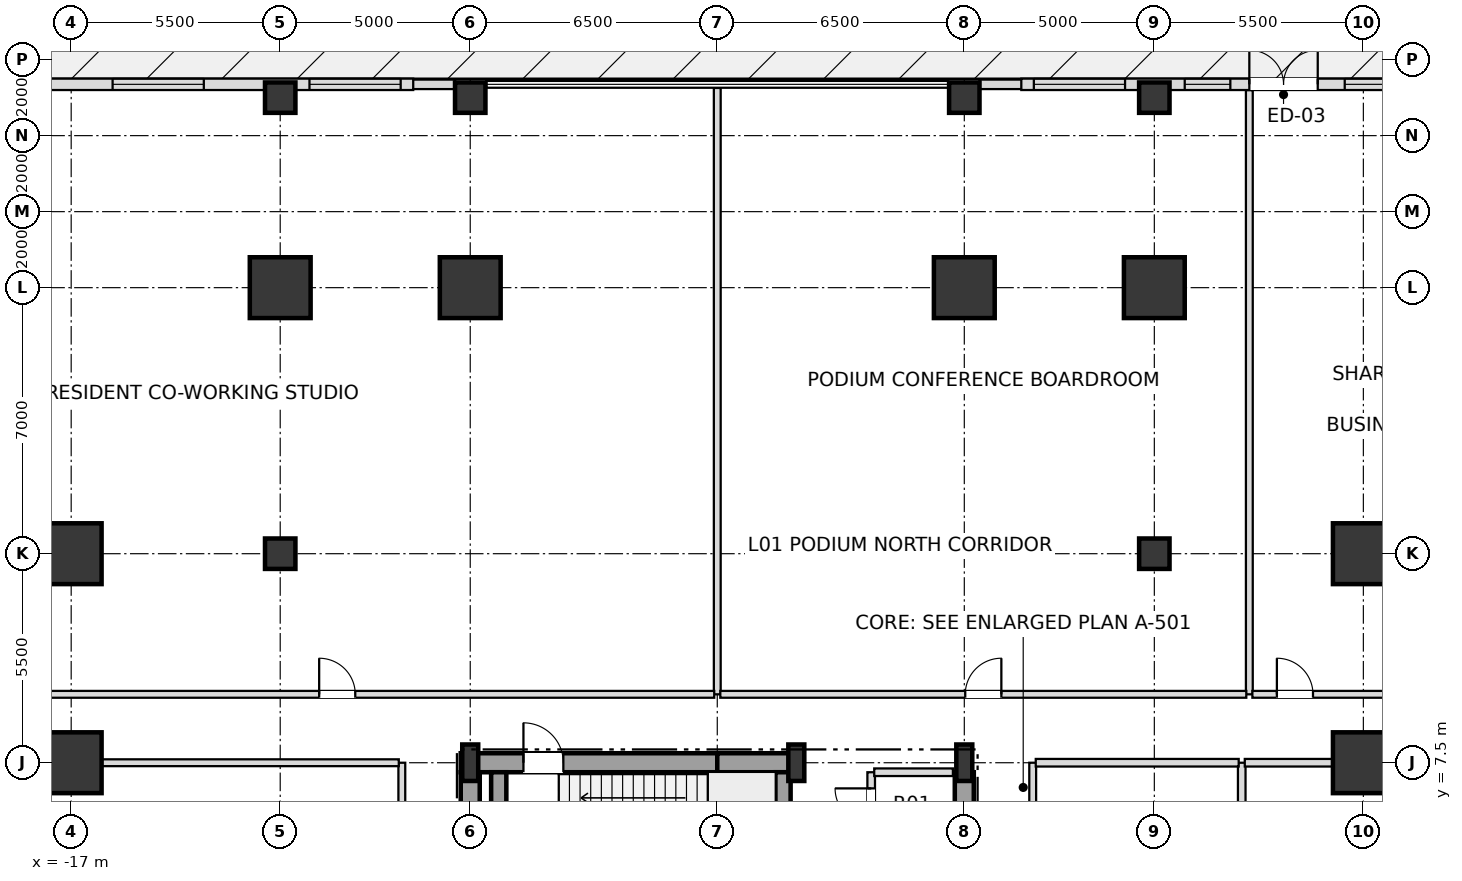
"""IFC4 building model, lengths in metres.
Left out: names, types, materials, properties, quantities, classifications, styles, units other than length and angle.
Written with IfcOpenShell. Run it as: python <this file> out.ifc"""

import sys

from ifc_helpers import new_model, si_unit, direction, frame, frame_2d, origin, origin_2d, place, context, subcontext, project, spatial, rectangle, i_section, extrude, element, fill, save


model = new_model("IFC4")
c1 = context("Model", 3, precision=1e-05, world=origin(), true_north=direction((0.0, 1.0)))
c2 = subcontext(c1, "Body", "Model", "MODEL_VIEW")
j1 = project(units=[si_unit("LENGTHUNIT", "METRE"), si_unit("PLANEANGLEUNIT", "RADIAN")], contexts=[c1])
p1 = place(None, origin())
s1 = spatial("IfcSite", under=j1, at=p1, CompositionType="ELEMENT")
p2 = place(p1, origin())
s2 = spatial("IfcBuilding", under=s1, at=p2, CompositionType="ELEMENT")
p3 = place(p2, frame((0.0, 0.0, 6.0)))
s3 = spatial("IfcBuildingStorey", under=s2, at=p3, CompositionType="ELEMENT", Elevation=6.0)
for number, where, z_axis, x_axis in (
    (1, (-6.5, 7.5, 0.0), (0.0, 0.0, 1.0), (1.0, 0.0, 0.0)),
    (2, (2.08, 7.5, 0.0), (0.0, 0.0, 1.0), (1.0, 0.0, 0.0)),
    (3, (6.5, 7.5, 0.0), (0.0, 0.0, 1.0), (1.0, 0.0, 0.0)),
):
    element("IfcColumn", number, at=place(p3, frame(where, z_axis=z_axis, x_axis=x_axis)), inside=s3, PredefinedType="COLUMN", context=c2, shape_type="SweptSolid", body=[
        extrude(i_section(OverallWidth=0.42, OverallDepth=0.96, WebThickness=0.022, FlangeThickness=0.034, at=origin_2d()), origin(), (0.0, 0.0, 1.0), 5.4),
    ])
for number, where, z_axis, x_axis in (
    (4, (17.0, 7.5, 0.0), (0.0, 0.0, 1.0), (1.0, 0.0, 0.0)),
    (5, (17.0, 13.0, 0.0), (0.0, 0.0, 1.0), (1.0, 0.0, 0.0)),
    (6, (11.5, 20.0, 0.0), (0.0, 0.0, 1.0), (1.0, 0.0, 0.0)),
    (7, (6.5, 20.0, 0.0), (0.0, 0.0, 1.0), (1.0, 0.0, 0.0)),
    (8, (-6.5, 20.0, 0.0), (0.0, 0.0, 1.0), (1.0, 0.0, 0.0)),
    (9, (-11.5, 20.0, 0.0), (0.0, 0.0, 1.0), (1.0, 0.0, 0.0)),
    (10, (-17.0, 13.0, 0.0), (0.0, 0.0, 1.0), (1.0, 0.0, 0.0)),
    (11, (-17.0, 7.5, 0.0), (0.0, 0.0, 1.0), (1.0, 0.0, 0.0)),
):
    element("IfcColumn", number, at=place(p3, frame(where, z_axis=z_axis, x_axis=x_axis)), inside=s3, PredefinedType="USERDEFINED", context=c2, shape_type="SweptSolid", body=[
        extrude(rectangle(XDim=1.6, YDim=1.6, at=origin_2d()), origin(), (0.0, 0.0, 1.0), 5.4),
    ])
for number, where, z_axis, x_axis in (
    (12, (-11.5, 13.0, 0.0), (0.0, 0.0, 1.0), (1.0, 0.0, 0.0)),
    (13, (11.5, 13.0, 0.0), (0.0, 0.0, 1.0), (1.0, 0.0, 0.0)),
    (14, (-11.5, 25.0, 0.0), (0.0, 0.0, 1.0), (1.0, 0.0, 0.0)),
    (15, (-6.5, 25.0, 0.0), (0.0, 0.0, 1.0), (1.0, 0.0, 0.0)),
    (16, (6.5, 25.0, 0.0), (0.0, 0.0, 1.0), (1.0, 0.0, 0.0)),
    (17, (11.5, 25.0, 0.0), (0.0, 0.0, 1.0), (1.0, 0.0, 0.0)),
):
    element("IfcColumn", number, at=place(p3, frame(where, z_axis=z_axis, x_axis=x_axis)), inside=s3, PredefinedType="COLUMN", context=c2, shape_type="SweptSolid", body=[
        extrude(rectangle(XDim=0.8, YDim=0.8, at=origin_2d()), origin(), (0.0, 0.0, 1.0), 5.4),
    ])
for number, where, z_axis, x_axis in (
    (18, (8.025, 25.35, 0.0), (0.0, 0.0, 1.0), (-1.0, 0.0, 0.0)),
    (19, (-6.895, 25.35, 0.0), (0.0, 0.0, 1.0), (-1.0, 0.0, 0.0)),
):
    element("IfcWall", number, at=place(p3, frame(where, z_axis=z_axis, x_axis=x_axis)), inside=s3, PredefinedType="SOLIDWALL", context=c2, shape_type="SweptSolid", body=[
        extrude(rectangle(XDim=1.13, YDim=0.25, at=frame_2d((0.565, 0.0))), origin(), (0.0, 0.0, 1.0), 4.476),
    ])
p4 = place(p3, frame((-22.85, 25.35, 0.0), z_axis=(0.0, 0.0, 1.0), x_axis=(1.0, 0.0, 0.0)))
e20 = element("IfcWall", 20, at=p4, inside=s3, PredefinedType="SOLIDWALL", context=c2, shape_type="SweptSolid", body=[
    extrude(rectangle(XDim=14.85, YDim=0.3, at=frame_2d((7.425, 0.0))), origin(), (0.0, 0.0, 1.0), 4.476),
])
p5 = place(p4, frame((1.72, 0.0, 0.8)))
e21 = element("IfcOpeningElement", 21, at=p5, cuts=e20, PredefinedType="OPENING", context=c2, shape_type="SweptSolid", body=[
    extrude(rectangle(XDim=2.4, YDim=2.2, at=frame_2d((1.2, 1.1))), frame((0.0, 0.16, 0.0), z_axis=(0.0, -1.0, 0.0), x_axis=(1.0, 0.0, 0.0)), (0.0, 0.0, 1.0), 0.32),
])
p6 = place(p4, frame((6.94, 0.0, 0.8)))
e22 = element("IfcOpeningElement", 22, at=p6, cuts=e20, PredefinedType="OPENING", context=c2, shape_type="SweptSolid", body=[
    extrude(rectangle(XDim=2.4, YDim=2.2, at=frame_2d((1.2, 1.1))), frame((0.0, 0.16, 0.0), z_axis=(0.0, -1.0, 0.0), x_axis=(1.0, 0.0, 0.0)), (0.0, 0.0, 1.0), 0.32),
])
p7 = place(p4, frame((12.12, 0.0, 0.8)))
e23 = element("IfcOpeningElement", 23, at=p7, cuts=e20, PredefinedType="OPENING", context=c2, shape_type="SweptSolid", body=[
    extrude(rectangle(XDim=2.4, YDim=2.2, at=frame_2d((1.2, 1.1))), frame((0.0, 0.16, 0.0), z_axis=(0.0, -1.0, 0.0), x_axis=(1.0, 0.0, 0.0)), (0.0, 0.0, 1.0), 0.32),
])
p8 = place(p3, frame((8.0, 25.35, 0.0), z_axis=(0.0, 0.0, 1.0), x_axis=(1.0, 0.0, 0.0)))
e24 = element("IfcWall", 24, at=p8, inside=s3, PredefinedType="SOLIDWALL", context=c2, shape_type="SweptSolid", body=[
    extrude(rectangle(XDim=14.85, YDim=0.3, at=frame_2d((7.425, 0.0))), origin(), (0.0, 0.0, 1.0), 4.476),
])
p9 = place(p8, frame((6.0, 0.0, 0.0)))
e25 = element("IfcOpeningElement", 25, at=p9, cuts=e24, PredefinedType="OPENING", context=c2, shape_type="SweptSolid", body=[
    extrude(rectangle(XDim=1.8, YDim=2.3, at=frame_2d((0.9, 1.15))), frame((0.0, 0.16, 0.0), z_axis=(0.0, -1.0, 0.0), x_axis=(1.0, 0.0, 0.0)), (0.0, 0.0, 1.0), 0.32),
])
p10 = place(p8, frame((0.33, 0.0, 0.8)))
e26 = element("IfcOpeningElement", 26, at=p10, cuts=e24, PredefinedType="OPENING", context=c2, shape_type="SweptSolid", body=[
    extrude(rectangle(XDim=2.4, YDim=2.2, at=frame_2d((1.2, 1.1))), frame((0.0, 0.16, 0.0), z_axis=(0.0, -1.0, 0.0), x_axis=(1.0, 0.0, 0.0)), (0.0, 0.0, 1.0), 0.32),
])
p11 = place(p8, frame((4.3, 0.0, 0.72)))
e27 = element("IfcOpeningElement", 27, at=p11, cuts=e24, PredefinedType="OPENING", context=c2, shape_type="SweptSolid", body=[
    extrude(rectangle(XDim=1.2, YDim=1.68, at=frame_2d((0.6, 0.84))), frame((0.0, 0.16, 0.0), z_axis=(0.0, -1.0, 0.0), x_axis=(1.0, 0.0, 0.0)), (0.0, 0.0, 1.0), 0.32),
])
p12 = place(p8, frame((8.51, 0.0, 0.8)))
e28 = element("IfcOpeningElement", 28, at=p12, cuts=e24, PredefinedType="OPENING", context=c2, shape_type="SweptSolid", body=[
    extrude(rectangle(XDim=2.4, YDim=2.2, at=frame_2d((1.2, 1.1))), frame((0.0, 0.16, 0.0), z_axis=(0.0, -1.0, 0.0), x_axis=(1.0, 0.0, 0.0)), (0.0, 0.0, 1.0), 0.32),
])
p13 = place(p8, frame((11.73, 0.0, 0.8)))
e29 = element("IfcOpeningElement", 29, at=p13, cuts=e24, PredefinedType="OPENING", context=c2, shape_type="SweptSolid", body=[
    extrude(rectangle(XDim=2.4, YDim=2.2, at=frame_2d((1.2, 1.1))), frame((0.0, 0.16, 0.0), z_axis=(0.0, -1.0, 0.0), x_axis=(1.0, 0.0, 0.0)), (0.0, 0.0, 1.0), 0.32),
])
p14 = place(p3, frame((-6.75, 7.5, 0.0), z_axis=(0.0, 0.0, 1.0), x_axis=(1.0, 0.0, 0.0)))
e30 = element("IfcWall", 30, at=p14, inside=s3, PredefinedType="SHEAR", context=c2, shape_type="SweptSolid", body=[
    extrude(rectangle(XDim=6.75, YDim=0.5, at=frame_2d((3.375, 0.0))), origin(), (0.0, 0.0, 1.0), 5.12),
])
p15 = place(p14, frame((1.65, 0.0, 0.0)))
e31 = element("IfcOpeningElement", 31, at=p15, cuts=e30, PredefinedType="OPENING", context=c2, shape_type="SweptSolid", body=[
    extrude(rectangle(XDim=1.05, YDim=2.15, at=frame_2d((0.525, 1.075))), frame((0.0, 0.26, 0.0), z_axis=(0.0, -1.0, 0.0), x_axis=(1.0, 0.0, 0.0)), (0.0, 0.0, 1.0), 0.52),
])
p16 = place(p3, frame((0.0, 7.5, 0.0), z_axis=(0.0, 0.0, 1.0), x_axis=(1.0, 0.0, 0.0)))
e32 = element("IfcWall", 32, at=p16, inside=s3, PredefinedType="SHEAR", context=c2, shape_type="SweptSolid", body=[
    extrude(rectangle(XDim=2.08, YDim=0.5, at=frame_2d((1.04, 0.0))), origin(), (0.0, 0.0, 1.0), 5.12),
])
for number, where, z_axis, x_axis in (
    (33, (-6.5, 3.95, 0.0), (0.0, 0.0, 1.0), (0.0, 1.0, 0.0)),
    (34, (6.5, 3.95, 0.0), (0.0, 0.0, 1.0), (0.0, 1.0, 0.0)),
):
    element("IfcWall", number, at=place(p3, frame(where, z_axis=z_axis, x_axis=x_axis)), inside=s3, PredefinedType="SHEAR", context=c2, shape_type="SweptSolid", body=[
        extrude(rectangle(XDim=3.3, YDim=0.5, at=frame_2d((1.65, 0.0))), origin(), (0.0, 0.0, 1.0), 5.12),
    ])
for number, where, z_axis, x_axis in (
    (35, (1.73, 3.95, 0.0), (0.0, 0.0, 1.0), (0.0, 1.0, 0.0)),
    (36, (-5.75, 3.95, 0.0), (0.0, 0.0, 1.0), (0.0, 1.0, 0.0)),
):
    element("IfcWall", number, at=place(p3, frame(where, z_axis=z_axis, x_axis=x_axis)), inside=s3, PredefinedType="SHEAR", context=c2, shape_type="SweptSolid", body=[
        extrude(rectangle(XDim=3.3, YDim=0.4, at=frame_2d((1.65, 0.0))), origin(), (0.0, 0.0, 1.0), 5.12),
    ])
p17 = place(p3, frame((-8.3, -7.5, 0.0), z_axis=(0.0, 0.0, 1.0), x_axis=(0.0, 1.0, 0.0)))
e37 = element("IfcWall", 37, at=p17, inside=s3, PredefinedType="PARTITIONING", context=c2, shape_type="SweptSolid", body=[
    extrude(rectangle(XDim=15.0, YDim=0.18, at=frame_2d((7.5, 0.0))), origin(), (0.0, 0.0, 1.0), 5.12),
])
p18 = place(p17, frame((7.025, 0.0, 0.0)))
e38 = element("IfcOpeningElement", 38, at=p18, cuts=e37, PredefinedType="OPENING", context=c2, shape_type="SweptSolid", body=[
    extrude(rectangle(XDim=0.95, YDim=2.15, at=frame_2d((0.475, 1.075))), frame((0.0, 0.1, 0.0), z_axis=(0.0, -1.0, 0.0), x_axis=(1.0, 0.0, 0.0)), (0.0, 0.0, 1.0), 0.2),
])
p19 = place(p3, frame((0.0, 9.3, 0.0), z_axis=(0.0, 0.0, 1.0), x_axis=(0.0, 1.0, 0.0)))
e39 = element("IfcWall", 39, at=p19, inside=s3, PredefinedType="PARTITIONING", context=c2, shape_type="SweptSolid", body=[
    extrude(rectangle(XDim=15.955, YDim=0.18, at=frame_2d((7.978, 0.0))), origin(), (0.0, 0.0, 1.0), 4.476),
])
p20 = place(p3, frame((4.05, 5.55, 0.0), z_axis=(0.0, 0.0, 1.0), x_axis=(0.0, 1.0, 0.0)))
e40 = element("IfcWall", 40, at=p20, inside=s3, PredefinedType="SOLIDWALL", context=c2, shape_type="SweptSolid", body=[
    extrude(rectangle(XDim=1.7, YDim=0.2, at=frame_2d((0.85, 0.0))), origin(), (0.0, 0.0, 1.0), 5.12),
])
p21 = place(p20, frame((0.325, 0.0, 0.0)))
e41 = element("IfcOpeningElement", 41, at=p21, cuts=e40, PredefinedType="OPENING", context=c2, shape_type="SweptSolid", body=[
    extrude(rectangle(XDim=0.95, YDim=2.15, at=frame_2d((0.475, 1.075))), frame((0.0, 0.11, 0.0), z_axis=(0.0, -1.0, 0.0), x_axis=(1.0, 0.0, 0.0)), (0.0, 0.0, 1.0), 0.22),
])
p22 = place(p3, frame((8.3, -7.5, 0.0), z_axis=(0.0, 0.0, 1.0), x_axis=(0.0, 1.0, 0.0)))
e42 = element("IfcWall", 42, at=p22, inside=s3, PredefinedType="PARTITIONING", context=c2, shape_type="SweptSolid", body=[
    extrude(rectangle(XDim=15.0, YDim=0.18, at=frame_2d((7.5, 0.0))), origin(), (0.0, 0.0, 1.0), 5.12),
])
p23 = place(p22, frame((5.025, 0.0, 0.0)))
e43 = element("IfcOpeningElement", 43, at=p23, cuts=e42, PredefinedType="OPENING", context=c2, shape_type="SweptSolid", body=[
    extrude(rectangle(XDim=0.95, YDim=2.15, at=frame_2d((0.475, 1.075))), frame((0.0, 0.1, 0.0), z_axis=(0.0, -1.0, 0.0), x_axis=(1.0, 0.0, 0.0)), (0.0, 0.0, 1.0), 0.2),
])
p24 = place(p22, frame((12.225, 0.0, 0.0)))
e44 = element("IfcOpeningElement", 44, at=p24, cuts=e42, PredefinedType="OPENING", context=c2, shape_type="SweptSolid", body=[
    extrude(rectangle(XDim=0.95, YDim=2.15, at=frame_2d((0.475, 1.075))), frame((0.0, 0.1, 0.0), z_axis=(0.0, -1.0, 0.0), x_axis=(1.0, 0.0, 0.0)), (0.0, 0.0, 1.0), 0.2),
])
p25 = place(p3, frame((13.8, 3.2, 0.0), z_axis=(0.0, 0.0, 1.0), x_axis=(0.0, 1.0, 0.0)))
e45 = element("IfcWall", 45, at=p25, inside=s3, PredefinedType="SOLIDWALL", context=c2, shape_type="SweptSolid", body=[
    extrude(rectangle(XDim=4.3, YDim=0.2, at=frame_2d((2.15, 0.0))), origin(), (0.0, 0.0, 1.0), 5.12),
])
p26 = place(p3, frame((14.0, 9.3, 0.0), z_axis=(0.0, 0.0, 1.0), x_axis=(0.0, 1.0, 0.0)))
e46 = element("IfcWall", 46, at=p26, inside=s3, PredefinedType="PARTITIONING", context=c2, shape_type="SweptSolid", body=[
    extrude(rectangle(XDim=15.895, YDim=0.18, at=frame_2d((7.948, 0.0))), origin(), (0.0, 0.0, 1.0), 4.41),
])
p27 = place(p3, frame((4.13, 7.25, 0.0), z_axis=(0.0, 0.0, 1.0), x_axis=(1.0, 0.0, 0.0)))
e47 = element("IfcWall", 47, at=p27, inside=s3, PredefinedType="SOLIDWALL", context=c2, shape_type="SweptSolid", body=[
    extrude(rectangle(XDim=2.07, YDim=0.2, at=frame_2d((1.035, 0.0))), origin(), (0.0, 0.0, 1.0), 4.41),
])
p28 = place(p3, frame((-22.695, 7.5, 0.0), z_axis=(0.0, 0.0, 1.0), x_axis=(1.0, 0.0, 0.0)))
e48 = element("IfcWall", 48, at=p28, inside=s3, PredefinedType="PARTITIONING", context=c2, shape_type="SweptSolid", body=[
    extrude(rectangle(XDim=14.315, YDim=0.18, at=frame_2d((7.158, 0.0))), origin(), (0.0, 0.0, 1.0), 4.41),
])
p29 = place(p3, frame((8.38, 7.5, 0.0), z_axis=(0.0, 0.0, 1.0), x_axis=(1.0, 0.0, 0.0)))
e49 = element("IfcWall", 49, at=p29, inside=s3, PredefinedType="SOLIDWALL", context=c2, shape_type="SweptSolid", body=[
    extrude(rectangle(XDim=5.34, YDim=0.2, at=frame_2d((2.67, 0.0))), origin(), (0.0, 0.0, 1.0), 4.41),
])
p30 = place(p3, frame((13.88, 7.5, 0.0), z_axis=(0.0, 0.0, 1.0), x_axis=(1.0, 0.0, 0.0)))
e50 = element("IfcWall", 50, at=p30, inside=s3, PredefinedType="SOLIDWALL", context=c2, shape_type="SweptSolid", body=[
    extrude(rectangle(XDim=8.855, YDim=0.2, at=frame_2d((4.428, 0.0))), origin(), (0.0, 0.0, 1.0), 4.41),
])
p31 = place(p3, frame((-22.695, 9.3, 0.0), z_axis=(0.0, 0.0, 1.0), x_axis=(1.0, 0.0, 0.0)))
e51 = element("IfcWall", 51, at=p31, inside=s3, PredefinedType="PARTITIONING", context=c2, shape_type="SweptSolid", body=[
    extrude(rectangle(XDim=22.615, YDim=0.18, at=frame_2d((11.308, 0.0))), origin(), (0.0, 0.0, 1.0), 4.41),
])
p32 = place(p31, frame((12.22, 0.0, 0.0)))
e52 = element("IfcOpeningElement", 52, at=p32, cuts=e51, PredefinedType="OPENING", context=c2, shape_type="SweptSolid", body=[
    extrude(rectangle(XDim=0.95, YDim=2.15, at=frame_2d((0.475, 1.075))), frame((0.0, 0.1, 0.0), z_axis=(0.0, -1.0, 0.0), x_axis=(1.0, 0.0, 0.0)), (0.0, 0.0, 1.0), 0.2),
])
p33 = place(p3, frame((0.08, 9.3, 0.0), z_axis=(0.0, 0.0, 1.0), x_axis=(1.0, 0.0, 0.0)))
e53 = element("IfcWall", 53, at=p33, inside=s3, PredefinedType="PARTITIONING", context=c2, shape_type="SweptSolid", body=[
    extrude(rectangle(XDim=13.84, YDim=0.18, at=frame_2d((6.92, 0.0))), origin(), (0.0, 0.0, 1.0), 4.41),
])
p34 = place(p33, frame((6.445, 0.0, 0.0)))
e54 = element("IfcOpeningElement", 54, at=p34, cuts=e53, PredefinedType="OPENING", context=c2, shape_type="SweptSolid", body=[
    extrude(rectangle(XDim=0.95, YDim=2.15, at=frame_2d((0.475, 1.075))), frame((0.0, 0.1, 0.0), z_axis=(0.0, -1.0, 0.0), x_axis=(1.0, 0.0, 0.0)), (0.0, 0.0, 1.0), 0.2),
])
p35 = place(p3, frame((14.08, 9.3, 0.0), z_axis=(0.0, 0.0, 1.0), x_axis=(1.0, 0.0, 0.0)))
e55 = element("IfcWall", 55, at=p35, inside=s3, PredefinedType="PARTITIONING", context=c2, shape_type="SweptSolid", body=[
    extrude(rectangle(XDim=8.655, YDim=0.18, at=frame_2d((4.328, 0.0))), origin(), (0.0, 0.0, 1.0), 4.41),
])
p36 = place(p35, frame((0.645, 0.0, 0.0)))
e56 = element("IfcOpeningElement", 56, at=p36, cuts=e55, PredefinedType="OPENING", context=c2, shape_type="SweptSolid", body=[
    extrude(rectangle(XDim=0.95, YDim=2.15, at=frame_2d((0.475, 1.075))), frame((0.0, 0.1, 0.0), z_axis=(0.0, -1.0, 0.0), x_axis=(1.0, 0.0, 0.0)), (0.0, 0.0, 1.0), 0.2),
])
p37 = place(p9, origin())
e57 = element("IfcDoor", 57, at=p37, inside=s3, OperationType="DOUBLE_DOOR_SINGLE_SWING", PredefinedType="DOOR", context=c2, shape_type="SweptSolid", body=[
    extrude(rectangle(XDim=1.8, YDim=2.3, at=frame_2d((0.9, 1.15))), frame((0.0, 0.025, 0.0), z_axis=(0.0, -1.0, 0.0), x_axis=(1.0, 0.0, 0.0)), (0.0, 0.0, 1.0), 0.05),
])
fill(e25, e57)
p38 = place(p6, origin())
e58 = element("IfcWindow", 58, at=p38, inside=s3, PartitioningType="SINGLE_PANEL", PredefinedType="WINDOW", context=c2, shape_type="SweptSolid", body=[
    extrude(rectangle(XDim=2.4, YDim=2.2, at=frame_2d((1.2, 1.1))), frame((0.0, 0.03, 0.0), z_axis=(0.0, -1.0, 0.0), x_axis=(1.0, 0.0, 0.0)), (0.0, 0.0, 1.0), 0.06),
])
fill(e22, e58)
p39 = place(p7, origin())
e59 = element("IfcWindow", 59, at=p39, inside=s3, PartitioningType="SINGLE_PANEL", PredefinedType="WINDOW", context=c2, shape_type="SweptSolid", body=[
    extrude(rectangle(XDim=2.4, YDim=2.2, at=frame_2d((1.2, 1.1))), frame((0.0, 0.03, 0.0), z_axis=(0.0, -1.0, 0.0), x_axis=(1.0, 0.0, 0.0)), (0.0, 0.0, 1.0), 0.06),
])
fill(e23, e59)
p40 = place(p10, origin())
e60 = element("IfcWindow", 60, at=p40, inside=s3, PartitioningType="SINGLE_PANEL", PredefinedType="WINDOW", context=c2, shape_type="SweptSolid", body=[
    extrude(rectangle(XDim=2.4, YDim=2.2, at=frame_2d((1.2, 1.1))), frame((0.0, 0.03, 0.0), z_axis=(0.0, -1.0, 0.0), x_axis=(1.0, 0.0, 0.0)), (0.0, 0.0, 1.0), 0.06),
])
fill(e26, e60)
p41 = place(p11, origin())
e61 = element("IfcWindow", 61, at=p41, inside=s3, PartitioningType="SINGLE_PANEL", PredefinedType="WINDOW", context=c2, shape_type="SweptSolid", body=[
    extrude(rectangle(XDim=1.2, YDim=1.68, at=frame_2d((0.6, 0.84))), frame((0.0, 0.03, 0.0), z_axis=(0.0, -1.0, 0.0), x_axis=(1.0, 0.0, 0.0)), (0.0, 0.0, 1.0), 0.06),
])
fill(e27, e61)
p42 = place(p12, origin())
e62 = element("IfcWindow", 62, at=p42, inside=s3, PartitioningType="SINGLE_PANEL", PredefinedType="WINDOW", context=c2, shape_type="SweptSolid", body=[
    extrude(rectangle(XDim=2.4, YDim=2.2, at=frame_2d((1.2, 1.1))), frame((0.0, 0.03, 0.0), z_axis=(0.0, -1.0, 0.0), x_axis=(1.0, 0.0, 0.0)), (0.0, 0.0, 1.0), 0.06),
])
fill(e28, e62)
p43 = place(p15, origin())
e63 = element("IfcDoor", 63, at=p43, inside=s3, OperationType="SINGLE_SWING_LEFT", PredefinedType="DOOR", context=c2, shape_type="SweptSolid", body=[
    extrude(rectangle(XDim=1.05, YDim=2.15, at=frame_2d((0.525, 1.075))), frame((0.0, 0.025, 0.0), z_axis=(0.0, -1.0, 0.0), x_axis=(1.0, 0.0, 0.0)), (0.0, 0.0, 1.0), 0.05),
])
fill(e31, e63)
p44 = place(p21, origin())
e64 = element("IfcDoor", 64, at=p44, inside=s3, OperationType="SINGLE_SWING_RIGHT", PredefinedType="DOOR", context=c2, shape_type="SweptSolid", body=[
    extrude(rectangle(XDim=0.95, YDim=2.15, at=frame_2d((0.475, 1.075))), frame((0.0, 0.025, 0.0), z_axis=(0.0, -1.0, 0.0), x_axis=(1.0, 0.0, 0.0)), (0.0, 0.0, 1.0), 0.05),
])
fill(e41, e64)
p45 = place(p32, origin())
e65 = element("IfcDoor", 65, at=p45, inside=s3, OperationType="SINGLE_SWING_LEFT", PredefinedType="DOOR", context=c2, shape_type="SweptSolid", body=[
    extrude(rectangle(XDim=0.95, YDim=2.15, at=frame_2d((0.475, 1.075))), frame((0.0, 0.025, 0.0), z_axis=(0.0, -1.0, 0.0), x_axis=(1.0, 0.0, 0.0)), (0.0, 0.0, 1.0), 0.05),
])
fill(e52, e65)
p46 = place(p34, origin())
e66 = element("IfcDoor", 66, at=p46, inside=s3, OperationType="SINGLE_SWING_RIGHT", PredefinedType="DOOR", context=c2, shape_type="SweptSolid", body=[
    extrude(rectangle(XDim=0.95, YDim=2.15, at=frame_2d((0.475, 1.075))), frame((0.0, 0.025, 0.0), z_axis=(0.0, -1.0, 0.0), x_axis=(1.0, 0.0, 0.0)), (0.0, 0.0, 1.0), 0.05),
])
fill(e54, e66)
p47 = place(p36, origin())
e67 = element("IfcDoor", 67, at=p47, inside=s3, OperationType="SINGLE_SWING_LEFT", PredefinedType="DOOR", context=c2, shape_type="SweptSolid", body=[
    extrude(rectangle(XDim=0.95, YDim=2.15, at=frame_2d((0.475, 1.075))), frame((0.0, 0.025, 0.0), z_axis=(0.0, -1.0, 0.0), x_axis=(1.0, 0.0, 0.0)), (0.0, 0.0, 1.0), 0.05),
])
fill(e56, e67)
save(model, sys.argv[1])
